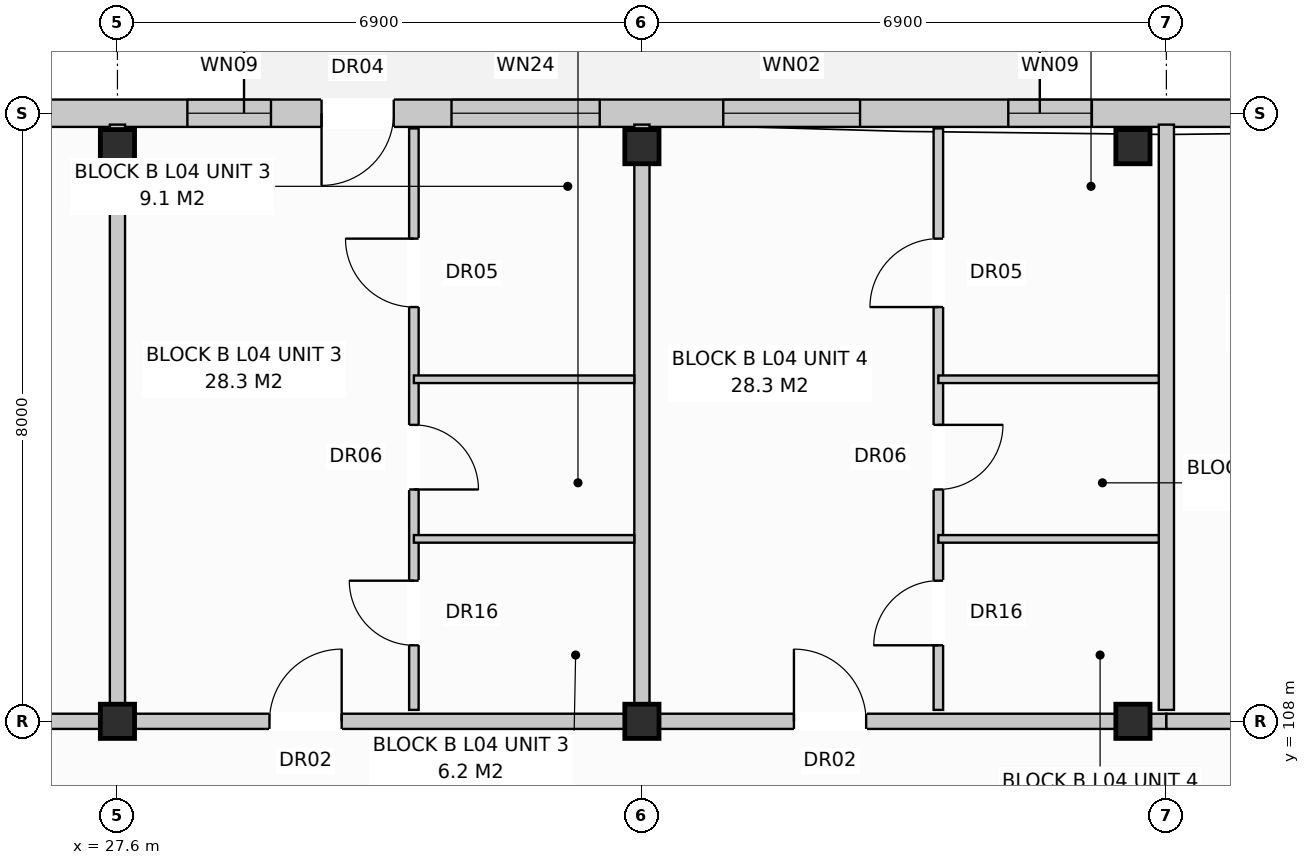
"""IFC4 building model, lengths in metres.
Left out: names, types, materials, properties, quantities, classifications, styles, units other than length and angle.
Written with IfcOpenShell. Run it as: python <this file> out.ifc"""

import sys

from ifc_helpers import new_model, si_unit, direction, frame, frame_2d, origin, origin_with_axes, origin_2d, place, context, subcontext, project, spatial, rectangle, extrude, element, fill, save


model = new_model("IFC4")
c1 = context("Model", 3, precision=1e-05, world=origin(), true_north=direction((0.0, 1.0)))
c2 = subcontext(c1, "Body", "Model", "MODEL_VIEW")
j1 = project(units=[si_unit("LENGTHUNIT", "METRE"), si_unit("PLANEANGLEUNIT", "RADIAN")], contexts=[c1])
p1 = place(None, origin())
s1 = spatial("IfcSite", under=j1, at=p1, CompositionType="ELEMENT")
p2 = place(p1, origin())
s2 = spatial("IfcBuilding", under=s1, at=p2, CompositionType="ELEMENT")
p3 = place(p2, frame((0.0, 0.0, 14.4)))
s3 = spatial("IfcBuildingStorey", under=s2, at=p3, CompositionType="ELEMENT", Elevation=14.4)
for number, where, z_axis, x_axis in (
    (1, (27.6, 108.0, 0.0), (0.0, 0.0, 1.0), (1.0, 0.0, 0.0)),
    (2, (27.6, 115.56, 0.0), (0.0, 0.0, 1.0), (1.0, 0.0, 0.0)),
    (3, (34.5, 108.0, 0.0), (0.0, 0.0, 1.0), (1.0, 0.0, 0.0)),
    (4, (34.5, 115.56, 0.0), (0.0, 0.0, 1.0), (1.0, 0.0, 0.0)),
    (5, (40.96, 108.0, 0.0), (0.0, 0.0, 1.0), (1.0, 0.0, 0.0)),
    (6, (40.96, 115.56, 0.0), (0.0, 0.0, 1.0), (1.0, 0.0, 0.0)),
):
    element("IfcColumn", number, at=place(p3, frame(where, z_axis=z_axis, x_axis=x_axis)), inside=s3, PredefinedType="COLUMN", context=c2, shape_type="SweptSolid", body=[
        extrude(rectangle(XDim=0.45, YDim=0.45, at=origin_2d()), origin(), (0.0, 0.0, 1.0), 3.2),
    ])
p4 = place(p3, frame((0.17, 116.0, 0.0), z_axis=(0.0, 0.0, 1.0), x_axis=(1.0, 0.0, 0.0)))
e7 = element("IfcWall", 7, at=p4, inside=s3, PredefinedType="STANDARD", context=c2, shape_type="SweptSolid", body=[
    extrude(rectangle(XDim=54.86, YDim=0.36, at=frame_2d((27.43, 0.0))), origin(), (0.0, 0.0, 1.0), 2.94),
])
p5 = place(p4, frame((3.815, 0.0, 0.0)))
e8 = element("IfcOpeningElement", 8, at=p5, cuts=e7, PredefinedType="OPENING", context=c2, shape_type="SweptSolid", body=[
    extrude(rectangle(XDim=0.95, YDim=2.1, at=frame_2d((0.475, 1.05))), frame((0.0, 0.192, 0.0), z_axis=(0.0, -1.0, 0.0), x_axis=(1.0, 0.0, 0.0)), (0.0, 0.0, 1.0), 0.384),
])
p6 = place(p4, frame((16.615, 0.0, 0.0)))
e9 = element("IfcOpeningElement", 9, at=p6, cuts=e7, PredefinedType="OPENING", context=c2, shape_type="SweptSolid", body=[
    extrude(rectangle(XDim=0.95, YDim=2.1, at=frame_2d((0.475, 1.05))), frame((0.0, 0.192, 0.0), z_axis=(0.0, -1.0, 0.0), x_axis=(1.0, 0.0, 0.0)), (0.0, 0.0, 1.0), 0.384),
])
p7 = place(p4, frame((30.115, 0.0, 0.0)))
e10 = element("IfcOpeningElement", 10, at=p7, cuts=e7, PredefinedType="OPENING", context=c2, shape_type="SweptSolid", body=[
    extrude(rectangle(XDim=0.95, YDim=2.1, at=frame_2d((0.475, 1.05))), frame((0.0, 0.192, 0.0), z_axis=(0.0, -1.0, 0.0), x_axis=(1.0, 0.0, 0.0)), (0.0, 0.0, 1.0), 0.384),
])
p8 = place(p4, frame((45.228, 0.0, 0.0)))
e11 = element("IfcOpeningElement", 11, at=p8, cuts=e7, PredefinedType="OPENING", context=c2, shape_type="SweptSolid", body=[
    extrude(rectangle(XDim=0.95, YDim=2.1, at=frame_2d((0.475, 1.05))), frame((0.0, 0.192, 0.0), z_axis=(0.0, -1.0, 0.0), x_axis=(1.0, 0.0, 0.0)), (0.0, 0.0, 1.0), 0.384),
])
p9 = place(p4, frame((1.55, 0.0, 0.8)))
e12 = element("IfcOpeningElement", 12, at=p9, cuts=e7, PredefinedType="OPENING", context=c2, shape_type="SweptSolid", body=[
    extrude(rectangle(XDim=1.9, YDim=1.85, at=frame_2d((0.95, 0.925))), frame((0.0, 0.192, 0.0), z_axis=(0.0, -1.0, 0.0), x_axis=(1.0, 0.0, 0.0)), (0.0, 0.0, 1.0), 0.384),
])
p10 = place(p4, frame((7.183, 0.0, 0.8)))
e13 = element("IfcOpeningElement", 13, at=p10, cuts=e7, PredefinedType="OPENING", context=c2, shape_type="SweptSolid", body=[
    extrude(rectangle(XDim=1.95, YDim=1.65, at=frame_2d((0.975, 0.825))), frame((0.0, 0.192, 0.0), z_axis=(0.0, -1.0, 0.0), x_axis=(1.0, 0.0, 0.0)), (0.0, 0.0, 1.0), 0.384),
])
p11 = place(p4, frame((10.85, 0.0, 0.72)))
e14 = element("IfcOpeningElement", 14, at=p11, cuts=e7, PredefinedType="OPENING", context=c2, shape_type="SweptSolid", body=[
    extrude(rectangle(XDim=1.1, YDim=1.5, at=frame_2d((0.55, 0.75))), frame((0.0, 0.192, 0.0), z_axis=(0.0, -1.0, 0.0), x_axis=(1.0, 0.0, 0.0)), (0.0, 0.0, 1.0), 0.384),
])
p12 = place(p4, frame((14.85, 0.0, 0.72)))
e15 = element("IfcOpeningElement", 15, at=p12, cuts=e7, PredefinedType="OPENING", context=c2, shape_type="SweptSolid", body=[
    extrude(rectangle(XDim=1.1, YDim=1.5, at=frame_2d((0.55, 0.75))), frame((0.0, 0.192, 0.0), z_axis=(0.0, -1.0, 0.0), x_axis=(1.0, 0.0, 0.0)), (0.0, 0.0, 1.0), 0.384),
])
p13 = place(p4, frame((18.125, 0.0, 0.8)))
e16 = element("IfcOpeningElement", 16, at=p13, cuts=e7, PredefinedType="OPENING", context=c2, shape_type="SweptSolid", body=[
    extrude(rectangle(XDim=1.95, YDim=1.65, at=frame_2d((0.975, 0.825))), frame((0.0, 0.192, 0.0), z_axis=(0.0, -1.0, 0.0), x_axis=(1.0, 0.0, 0.0)), (0.0, 0.0, 1.0), 0.384),
])
p14 = place(p4, frame((23.9, 0.0, 0.8)))
e17 = element("IfcOpeningElement", 17, at=p14, cuts=e7, PredefinedType="OPENING", context=c2, shape_type="SweptSolid", body=[
    extrude(rectangle(XDim=1.8, YDim=1.7, at=frame_2d((0.9, 0.85))), frame((0.0, 0.192, 0.0), z_axis=(0.0, -1.0, 0.0), x_axis=(1.0, 0.0, 0.0)), (0.0, 0.0, 1.0), 0.384),
])
p15 = place(p4, frame((28.35, 0.0, 0.72)))
e18 = element("IfcOpeningElement", 18, at=p15, cuts=e7, PredefinedType="OPENING", context=c2, shape_type="SweptSolid", body=[
    extrude(rectangle(XDim=1.1, YDim=1.5, at=frame_2d((0.55, 0.75))), frame((0.0, 0.192, 0.0), z_axis=(0.0, -1.0, 0.0), x_axis=(1.0, 0.0, 0.0)), (0.0, 0.0, 1.0), 0.384),
])
p16 = place(p4, frame((31.825, 0.0, 0.8)))
e19 = element("IfcOpeningElement", 19, at=p16, cuts=e7, PredefinedType="OPENING", context=c2, shape_type="SweptSolid", body=[
    extrude(rectangle(XDim=1.95, YDim=1.65, at=frame_2d((0.975, 0.825))), frame((0.0, 0.192, 0.0), z_axis=(0.0, -1.0, 0.0), x_axis=(1.0, 0.0, 0.0)), (0.0, 0.0, 1.0), 0.384),
])
p17 = place(p4, frame((35.4, 0.0, 0.8)))
e20 = element("IfcOpeningElement", 20, at=p17, cuts=e7, PredefinedType="OPENING", context=c2, shape_type="SweptSolid", body=[
    extrude(rectangle(XDim=1.8, YDim=1.7, at=frame_2d((0.9, 0.85))), frame((0.0, 0.192, 0.0), z_axis=(0.0, -1.0, 0.0), x_axis=(1.0, 0.0, 0.0)), (0.0, 0.0, 1.0), 0.384),
])
p18 = place(p4, frame((39.15, 0.0, 0.72)))
e21 = element("IfcOpeningElement", 21, at=p18, cuts=e7, PredefinedType="OPENING", context=c2, shape_type="SweptSolid", body=[
    extrude(rectangle(XDim=1.1, YDim=1.5, at=frame_2d((0.55, 0.75))), frame((0.0, 0.192, 0.0), z_axis=(0.0, -1.0, 0.0), x_axis=(1.0, 0.0, 0.0)), (0.0, 0.0, 1.0), 0.384),
])
p19 = place(p4, frame((43.35, 0.0, 0.72)))
e22 = element("IfcOpeningElement", 22, at=p19, cuts=e7, PredefinedType="OPENING", context=c2, shape_type="SweptSolid", body=[
    extrude(rectangle(XDim=1.1, YDim=1.5, at=frame_2d((0.55, 0.75))), frame((0.0, 0.192, 0.0), z_axis=(0.0, -1.0, 0.0), x_axis=(1.0, 0.0, 0.0)), (0.0, 0.0, 1.0), 0.384),
])
p20 = place(p4, frame((48.7, 0.0, 0.8)))
e23 = element("IfcOpeningElement", 23, at=p20, cuts=e7, PredefinedType="OPENING", context=c2, shape_type="SweptSolid", body=[
    extrude(rectangle(XDim=1.8, YDim=1.7, at=frame_2d((0.9, 0.85))), frame((0.0, 0.192, 0.0), z_axis=(0.0, -1.0, 0.0), x_axis=(1.0, 0.0, 0.0)), (0.0, 0.0, 1.0), 0.384),
])
p21 = place(p4, frame((52.25, 0.0, 0.72)))
e24 = element("IfcOpeningElement", 24, at=p21, cuts=e7, PredefinedType="OPENING", context=c2, shape_type="SweptSolid", body=[
    extrude(rectangle(XDim=1.1, YDim=1.5, at=frame_2d((0.55, 0.75))), frame((0.0, 0.192, 0.0), z_axis=(0.0, -1.0, 0.0), x_axis=(1.0, 0.0, 0.0)), (0.0, 0.0, 1.0), 0.384),
])
p22 = place(p3, frame((27.6, 108.15, 0.0), z_axis=(0.0, 0.0, 1.0), x_axis=(0.0, 1.0, 0.0)))
e25 = element("IfcWall", 25, at=p22, inside=s3, PredefinedType="PARTITIONING", context=c2, shape_type="SweptSolid", body=[
    extrude(rectangle(XDim=7.7, YDim=0.2, at=frame_2d((3.85, 0.0))), origin(), (0.0, 0.0, 1.0), 2.94),
])
p23 = place(p3, frame((13.8, 108.0, 0.0), z_axis=(0.0, 0.0, 1.0), x_axis=(1.0, 0.0, 0.0)))
e26 = element("IfcWall", 26, at=p23, inside=s3, PredefinedType="PARTITIONING", context=c2, shape_type="SweptSolid", body=[
    extrude(rectangle(XDim=13.8, YDim=0.2, at=frame_2d((6.9, 0.0))), origin(), (0.0, 0.0, 1.0), 2.38),
])
p24 = place(p23, frame((9.6, 0.0, 0.0)))
e27 = element("IfcOpeningElement", 27, at=p24, cuts=e26, PredefinedType="OPENING", context=c2, shape_type="SweptSolid", body=[
    extrude(rectangle(XDim=0.95, YDim=2.15, at=frame_2d((0.475, 1.075))), frame((0.0, 0.112, 0.0), z_axis=(0.0, -1.0, 0.0), x_axis=(1.0, 0.0, 0.0)), (0.0, 0.0, 1.0), 0.224),
])
p25 = place(p3, frame((34.5, 108.15, 0.0), z_axis=(0.0, 0.0, 1.0), x_axis=(0.0, 1.0, 0.0)))
e28 = element("IfcWall", 28, at=p25, inside=s3, PredefinedType="PARTITIONING", context=c2, shape_type="SweptSolid", body=[
    extrude(rectangle(XDim=7.7, YDim=0.2, at=frame_2d((3.85, 0.0))), origin(), (0.0, 0.0, 1.0), 2.94),
])
p26 = place(p3, frame((27.6, 108.0, 0.0), z_axis=(0.0, 0.0, 1.0), x_axis=(1.0, 0.0, 0.0)))
e29 = element("IfcWall", 29, at=p26, inside=s3, PredefinedType="PARTITIONING", context=c2, shape_type="SweptSolid", body=[
    extrude(rectangle(XDim=6.9, YDim=0.2, at=frame_2d((3.45, 0.0))), origin(), (0.0, 0.0, 1.0), 2.38),
])
p27 = place(p26, frame((2.0, 0.0, 0.0)))
e30 = element("IfcOpeningElement", 30, at=p27, cuts=e29, PredefinedType="OPENING", context=c2, shape_type="SweptSolid", body=[
    extrude(rectangle(XDim=0.95, YDim=2.15, at=frame_2d((0.475, 1.075))), frame((0.0, 0.112, 0.0), z_axis=(0.0, -1.0, 0.0), x_axis=(1.0, 0.0, 0.0)), (0.0, 0.0, 1.0), 0.224),
])
p28 = place(p3, frame((31.5, 108.15, 0.0), z_axis=(0.0, 0.0, 1.0), x_axis=(0.0, 1.0, 0.0)))
e31 = element("IfcWall", 31, at=p28, inside=s3, PredefinedType="PARTITIONING", context=c2, shape_type="SweptSolid", body=[
    extrude(rectangle(XDim=7.65, YDim=0.125, at=frame_2d((3.825, 0.0))), origin(), (0.0, 0.0, 1.0), 2.94),
])
p29 = place(p28, frame((0.85, 0.0, 0.0)))
e32 = element("IfcOpeningElement", 32, at=p29, cuts=e31, PredefinedType="OPENING", context=c2, shape_type="SweptSolid", body=[
    extrude(rectangle(XDim=0.85, YDim=2.1, at=frame_2d((0.425, 1.05))), frame((0.0, 0.074, 0.0), z_axis=(0.0, -1.0, 0.0), x_axis=(1.0, 0.0, 0.0)), (0.0, 0.0, 1.0), 0.149),
])
p30 = place(p28, frame((2.9, 0.0, 0.0)))
e33 = element("IfcOpeningElement", 33, at=p30, cuts=e31, PredefinedType="OPENING", context=c2, shape_type="SweptSolid", body=[
    extrude(rectangle(XDim=0.85, YDim=2.05, at=frame_2d((0.425, 1.025))), frame((0.0, 0.074, 0.0), z_axis=(0.0, -1.0, 0.0), x_axis=(1.0, 0.0, 0.0)), (0.0, 0.0, 1.0), 0.149),
])
p31 = place(p28, frame((5.3, 0.0, 0.0)))
e34 = element("IfcOpeningElement", 34, at=p31, cuts=e31, PredefinedType="OPENING", context=c2, shape_type="SweptSolid", body=[
    extrude(rectangle(XDim=0.9, YDim=2.1, at=frame_2d((0.45, 1.05))), frame((0.0, 0.074, 0.0), z_axis=(0.0, -1.0, 0.0), x_axis=(1.0, 0.0, 0.0)), (0.0, 0.0, 1.0), 0.149),
])
for number, where, z_axis, x_axis in (
    (35, (31.5, 110.4, 0.0), (0.0, 0.0, 1.0), (1.0, 0.0, 0.0)),
    (36, (31.5, 112.5, 0.0), (0.0, 0.0, 1.0), (1.0, 0.0, 0.0)),
):
    element("IfcWall", number, at=place(p3, frame(where, z_axis=z_axis, x_axis=x_axis)), inside=s3, PredefinedType="PARTITIONING", context=c2, shape_type="SweptSolid", body=[
        extrude(rectangle(XDim=2.9, YDim=0.1, at=frame_2d((1.45, 0.0))), origin(), (0.0, 0.0, 1.0), 2.94),
    ])
p32 = place(p3, frame((41.4, 108.15, 0.0), z_axis=(0.0, 0.0, 1.0), x_axis=(0.0, 1.0, 0.0)))
e37 = element("IfcWall", 37, at=p32, inside=s3, PredefinedType="PARTITIONING", context=c2, shape_type="SweptSolid", body=[
    extrude(rectangle(XDim=7.7, YDim=0.2, at=frame_2d((3.85, 0.0))), origin(), (0.0, 0.0, 1.0), 2.94),
])
p33 = place(p3, frame((34.5, 108.0, 0.0), z_axis=(0.0, 0.0, 1.0), x_axis=(1.0, 0.0, 0.0)))
e38 = element("IfcWall", 38, at=p33, inside=s3, PredefinedType="PARTITIONING", context=c2, shape_type="SweptSolid", body=[
    extrude(rectangle(XDim=6.9, YDim=0.2, at=frame_2d((3.45, 0.0))), origin(), (0.0, 0.0, 1.0), 2.38),
])
p34 = place(p33, frame((2.0, 0.0, 0.0)))
e39 = element("IfcOpeningElement", 39, at=p34, cuts=e38, PredefinedType="OPENING", context=c2, shape_type="SweptSolid", body=[
    extrude(rectangle(XDim=0.95, YDim=2.15, at=frame_2d((0.475, 1.075))), frame((0.0, 0.112, 0.0), z_axis=(0.0, -1.0, 0.0), x_axis=(1.0, 0.0, 0.0)), (0.0, 0.0, 1.0), 0.224),
])
p35 = place(p3, frame((38.4, 108.15, 0.0), z_axis=(0.0, 0.0, 1.0), x_axis=(0.0, 1.0, 0.0)))
e40 = element("IfcWall", 40, at=p35, inside=s3, PredefinedType="PARTITIONING", context=c2, shape_type="SweptSolid", body=[
    extrude(rectangle(XDim=7.65, YDim=0.125, at=frame_2d((3.825, 0.0))), origin(), (0.0, 0.0, 1.0), 2.94),
])
p36 = place(p35, frame((0.85, 0.0, 0.0)))
e41 = element("IfcOpeningElement", 41, at=p36, cuts=e40, PredefinedType="OPENING", context=c2, shape_type="SweptSolid", body=[
    extrude(rectangle(XDim=0.85, YDim=2.1, at=frame_2d((0.425, 1.05))), frame((0.0, 0.074, 0.0), z_axis=(0.0, -1.0, 0.0), x_axis=(1.0, 0.0, 0.0)), (0.0, 0.0, 1.0), 0.149),
])
p37 = place(p35, frame((2.9, 0.0, 0.0)))
e42 = element("IfcOpeningElement", 42, at=p37, cuts=e40, PredefinedType="OPENING", context=c2, shape_type="SweptSolid", body=[
    extrude(rectangle(XDim=0.85, YDim=2.05, at=frame_2d((0.425, 1.025))), frame((0.0, 0.074, 0.0), z_axis=(0.0, -1.0, 0.0), x_axis=(1.0, 0.0, 0.0)), (0.0, 0.0, 1.0), 0.149),
])
p38 = place(p35, frame((5.3, 0.0, 0.0)))
e43 = element("IfcOpeningElement", 43, at=p38, cuts=e40, PredefinedType="OPENING", context=c2, shape_type="SweptSolid", body=[
    extrude(rectangle(XDim=0.9, YDim=2.1, at=frame_2d((0.45, 1.05))), frame((0.0, 0.074, 0.0), z_axis=(0.0, -1.0, 0.0), x_axis=(1.0, 0.0, 0.0)), (0.0, 0.0, 1.0), 0.149),
])
for number, where, z_axis, x_axis in (
    (44, (38.4, 110.4, 0.0), (0.0, 0.0, 1.0), (1.0, 0.0, 0.0)),
    (45, (38.4, 112.5, 0.0), (0.0, 0.0, 1.0), (1.0, 0.0, 0.0)),
):
    element("IfcWall", number, at=place(p3, frame(where, z_axis=z_axis, x_axis=x_axis)), inside=s3, PredefinedType="PARTITIONING", context=c2, shape_type="SweptSolid", body=[
        extrude(rectangle(XDim=2.9, YDim=0.1, at=frame_2d((1.45, 0.0))), origin(), (0.0, 0.0, 1.0), 2.94),
    ])
p39 = place(p3, frame((41.4, 108.0, 0.0), z_axis=(0.0, 0.0, 1.0), x_axis=(1.0, 0.0, 0.0)))
e46 = element("IfcWall", 46, at=p39, inside=s3, PredefinedType="PARTITIONING", context=c2, shape_type="SweptSolid", body=[
    extrude(rectangle(XDim=13.8, YDim=0.2, at=frame_2d((6.9, 0.0))), origin(), (0.0, 0.0, 1.0), 2.38),
])
p40 = place(p39, frame((2.4, 0.0, 0.0)))
e47 = element("IfcOpeningElement", 47, at=p40, cuts=e46, PredefinedType="OPENING", context=c2, shape_type="SweptSolid", body=[
    extrude(rectangle(XDim=0.95, YDim=2.15, at=frame_2d((0.475, 1.075))), frame((0.0, 0.112, 0.0), z_axis=(0.0, -1.0, 0.0), x_axis=(1.0, 0.0, 0.0)), (0.0, 0.0, 1.0), 0.224),
])
p41 = place(p7, frame((0.95, 0.0, 0.0), z_axis=(0.0, 0.0, 1.0), x_axis=(-1.0, 0.0, 0.0)))
e48 = element("IfcDoor", 48, at=p41, inside=s3, OperationType="SINGLE_SWING_LEFT", PredefinedType="DOOR", context=c2, shape_type="SweptSolid", body=[
    extrude(rectangle(XDim=0.95, YDim=2.1, at=frame_2d((0.475, 1.05))), frame((0.0, 0.025, 0.0), z_axis=(0.0, -1.0, 0.0), x_axis=(1.0, 0.0, 0.0)), (0.0, 0.0, 1.0), 0.05),
])
fill(e10, e48)
p42 = place(p15, origin_with_axes())
e49 = element("IfcWindow", 49, at=p42, inside=s3, PartitioningType="SINGLE_PANEL", PredefinedType="WINDOW", context=c2, shape_type="SweptSolid", body=[
    extrude(rectangle(XDim=1.1, YDim=1.5, at=frame_2d((0.55, 0.75))), frame((0.0, 0.03, 0.0), z_axis=(0.0, -1.0, 0.0), x_axis=(1.0, 0.0, 0.0)), (0.0, 0.0, 1.0), 0.06),
])
fill(e18, e49)
p43 = place(p16, origin_with_axes())
e50 = element("IfcWindow", 50, at=p43, inside=s3, PartitioningType="SINGLE_PANEL", PredefinedType="WINDOW", context=c2, shape_type="SweptSolid", body=[
    extrude(rectangle(XDim=1.95, YDim=1.65, at=frame_2d((0.975, 0.825))), frame((0.0, 0.03, 0.0), z_axis=(0.0, -1.0, 0.0), x_axis=(1.0, 0.0, 0.0)), (0.0, 0.0, 1.0), 0.06),
])
fill(e19, e50)
p44 = place(p17, origin_with_axes())
e51 = element("IfcWindow", 51, at=p44, inside=s3, PartitioningType="SINGLE_PANEL", PredefinedType="WINDOW", context=c2, shape_type="SweptSolid", body=[
    extrude(rectangle(XDim=1.8, YDim=1.7, at=frame_2d((0.9, 0.85))), frame((0.0, 0.03, 0.0), z_axis=(0.0, -1.0, 0.0), x_axis=(1.0, 0.0, 0.0)), (0.0, 0.0, 1.0), 0.06),
])
fill(e20, e51)
p45 = place(p18, origin_with_axes())
e52 = element("IfcWindow", 52, at=p45, inside=s3, PartitioningType="SINGLE_PANEL", PredefinedType="WINDOW", context=c2, shape_type="SweptSolid", body=[
    extrude(rectangle(XDim=1.1, YDim=1.5, at=frame_2d((0.55, 0.75))), frame((0.0, 0.03, 0.0), z_axis=(0.0, -1.0, 0.0), x_axis=(1.0, 0.0, 0.0)), (0.0, 0.0, 1.0), 0.06),
])
fill(e21, e52)
p46 = place(p27, origin_with_axes())
e53 = element("IfcDoor", 53, at=p46, inside=s3, OperationType="SINGLE_SWING_RIGHT", PredefinedType="DOOR", context=c2, shape_type="SweptSolid", body=[
    extrude(rectangle(XDim=0.95, YDim=2.15, at=frame_2d((0.475, 1.075))), frame((0.0, 0.025, 0.0), z_axis=(0.0, -1.0, 0.0), x_axis=(1.0, 0.0, 0.0)), (0.0, 0.0, 1.0), 0.05),
])
fill(e30, e53)
p47 = place(p29, origin_with_axes())
e54 = element("IfcDoor", 54, at=p47, inside=s3, OperationType="SINGLE_SWING_RIGHT", PredefinedType="DOOR", context=c2, shape_type="SweptSolid", body=[
    extrude(rectangle(XDim=0.85, YDim=2.1, at=frame_2d((0.425, 1.05))), frame((0.0, 0.025, 0.0), z_axis=(0.0, -1.0, 0.0), x_axis=(1.0, 0.0, 0.0)), (0.0, 0.0, 1.0), 0.05),
])
fill(e32, e54)
p48 = place(p30, frame((0.85, 0.0, 0.0), z_axis=(0.0, 0.0, 1.0), x_axis=(-1.0, 0.0, 0.0)))
e55 = element("IfcDoor", 55, at=p48, inside=s3, OperationType="SINGLE_SWING_LEFT", PredefinedType="DOOR", context=c2, shape_type="SweptSolid", body=[
    extrude(rectangle(XDim=0.85, YDim=2.05, at=frame_2d((0.425, 1.025))), frame((0.0, 0.025, 0.0), z_axis=(0.0, -1.0, 0.0), x_axis=(1.0, 0.0, 0.0)), (0.0, 0.0, 1.0), 0.05),
])
fill(e33, e55)
p49 = place(p31, origin_with_axes())
e56 = element("IfcDoor", 56, at=p49, inside=s3, OperationType="SINGLE_SWING_RIGHT", PredefinedType="DOOR", context=c2, shape_type="SweptSolid", body=[
    extrude(rectangle(XDim=0.9, YDim=2.1, at=frame_2d((0.45, 1.05))), frame((0.0, 0.025, 0.0), z_axis=(0.0, -1.0, 0.0), x_axis=(1.0, 0.0, 0.0)), (0.0, 0.0, 1.0), 0.05),
])
fill(e34, e56)
p50 = place(p34, origin_with_axes())
e57 = element("IfcDoor", 57, at=p50, inside=s3, OperationType="SINGLE_SWING_LEFT", PredefinedType="DOOR", context=c2, shape_type="SweptSolid", body=[
    extrude(rectangle(XDim=0.95, YDim=2.15, at=frame_2d((0.475, 1.075))), frame((0.0, 0.025, 0.0), z_axis=(0.0, -1.0, 0.0), x_axis=(1.0, 0.0, 0.0)), (0.0, 0.0, 1.0), 0.05),
])
fill(e39, e57)
p51 = place(p36, origin_with_axes())
e58 = element("IfcDoor", 58, at=p51, inside=s3, OperationType="SINGLE_SWING_LEFT", PredefinedType="DOOR", context=c2, shape_type="SweptSolid", body=[
    extrude(rectangle(XDim=0.85, YDim=2.1, at=frame_2d((0.425, 1.05))), frame((0.0, 0.025, 0.0), z_axis=(0.0, -1.0, 0.0), x_axis=(1.0, 0.0, 0.0)), (0.0, 0.0, 1.0), 0.05),
])
fill(e41, e58)
p52 = place(p37, frame((0.85, 0.0, 0.0), z_axis=(0.0, 0.0, 1.0), x_axis=(-1.0, 0.0, 0.0)))
e59 = element("IfcDoor", 59, at=p52, inside=s3, OperationType="SINGLE_SWING_RIGHT", PredefinedType="DOOR", context=c2, shape_type="SweptSolid", body=[
    extrude(rectangle(XDim=0.85, YDim=2.05, at=frame_2d((0.425, 1.025))), frame((0.0, 0.025, 0.0), z_axis=(0.0, -1.0, 0.0), x_axis=(1.0, 0.0, 0.0)), (0.0, 0.0, 1.0), 0.05),
])
fill(e42, e59)
p53 = place(p38, origin_with_axes())
e60 = element("IfcDoor", 60, at=p53, inside=s3, OperationType="SINGLE_SWING_LEFT", PredefinedType="DOOR", context=c2, shape_type="SweptSolid", body=[
    extrude(rectangle(XDim=0.9, YDim=2.1, at=frame_2d((0.45, 1.05))), frame((0.0, 0.025, 0.0), z_axis=(0.0, -1.0, 0.0), x_axis=(1.0, 0.0, 0.0)), (0.0, 0.0, 1.0), 0.05),
])
fill(e43, e60)
save(model, sys.argv[1])
